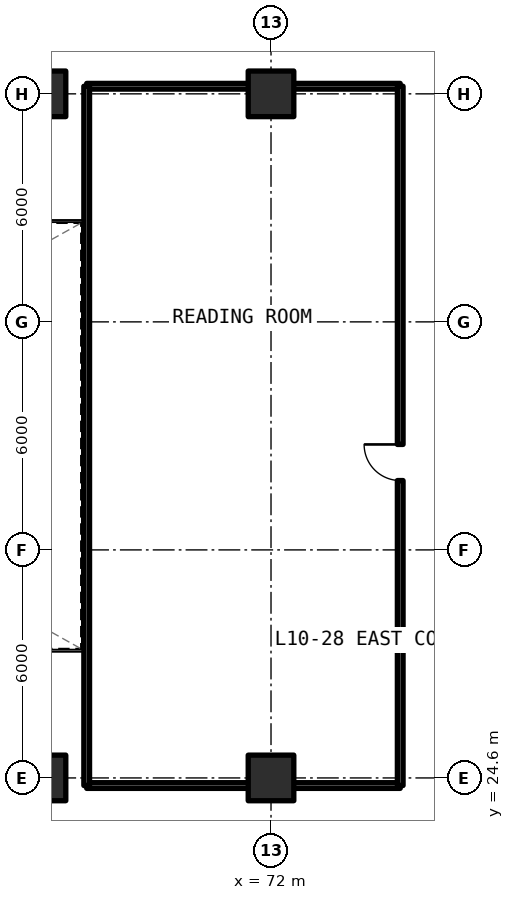
"""IFC4 building model, lengths in metres.
Left out: names, types, materials, properties, quantities, classifications, styles, units other than length and angle.
Written with IfcOpenShell. Run it as: python <this file> out.ifc"""

import sys

from ifc_helpers import new_model, si_unit, direction, frame, frame_2d, origin, origin_2d, place, context, subcontext, project, spatial, rectangle, extrude, element, fill, save


model = new_model("IFC4")
c1 = context("Model", 3, precision=1e-05, world=origin(), true_north=direction((0.0, 1.0)))
c2 = subcontext(c1, "Body", "Model", "MODEL_VIEW")
j1 = project(units=[si_unit("LENGTHUNIT", "METRE"), si_unit("PLANEANGLEUNIT", "RADIAN")], contexts=[c1])
p1 = place(None, origin())
s1 = spatial("IfcSite", under=j1, at=p1, CompositionType="ELEMENT")
p2 = place(p1, origin())
s2 = spatial("IfcBuilding", under=s1, at=p2, CompositionType="ELEMENT")
p3 = place(p2, frame((0.0, 0.0, 38.94)))
s3 = spatial("IfcBuildingStorey", under=s2, at=p3, CompositionType="ELEMENT", Elevation=38.94)
for number, where, z_axis, x_axis in (
    (1, (66.0, 24.6, 0.0), (0.0, 0.0, 1.0), (1.0, 0.0, 0.0)),
    (2, (66.0, 42.6, 0.0), (0.0, 0.0, 1.0), (1.0, 0.0, 0.0)),
    (3, (72.0, 24.6, 0.0), (0.0, 0.0, 1.0), (1.0, 0.0, 0.0)),
    (4, (72.0, 42.6, 0.0), (0.0, 0.0, 1.0), (1.0, 0.0, 0.0)),
):
    element("IfcColumn", number, at=place(p3, frame(where, z_axis=z_axis, x_axis=x_axis)), inside=s3, PredefinedType="COLUMN", context=c2, shape_type="SweptSolid", body=[
        extrude(rectangle(XDim=1.2, YDim=1.2, at=origin_2d()), origin(), (0.0, 0.0, 1.0), 3.3),
    ])
for number, where, z_axis, x_axis in (
    (5, (67.15, 24.4, 0.0), (0.0, 0.0, 1.0), (1.0, 0.0, 0.0)),
    (6, (67.15, 42.8, 0.0), (0.0, 0.0, 1.0), (1.0, 0.0, 0.0)),
):
    element("IfcWall", number, at=place(p3, frame(where, z_axis=z_axis, x_axis=x_axis)), inside=s3, PredefinedType="SOLIDWALL", context=c2, shape_type="SweptSolid", body=[
        extrude(rectangle(XDim=8.25, YDim=0.15, at=frame_2d((4.125, 0.0))), origin(), (0.0, 0.0, 1.0), 2.295),
    ])
p4 = place(p3, frame((67.15, 24.4, 0.0), z_axis=(0.0, 0.0, 1.0), x_axis=(0.0, 1.0, 0.0)))
e7 = element("IfcWall", 7, at=p4, inside=s3, PredefinedType="SOLIDWALL", context=c2, shape_type="SweptSolid", body=[
    extrude(rectangle(XDim=18.4, YDim=0.15, at=frame_2d((9.2, 0.0))), origin(), (0.0, 0.0, 1.0), 2.35),
])
p5 = place(p3, frame((75.4, 24.4, 0.0), z_axis=(0.0, 0.0, 1.0), x_axis=(0.0, 1.0, 0.0)))
e8 = element("IfcWall", 8, at=p5, inside=s3, PredefinedType="SOLIDWALL", context=c2, shape_type="SweptSolid", body=[
    extrude(rectangle(XDim=18.4, YDim=0.15, at=frame_2d((9.2, 0.0))), origin(), (0.0, 0.0, 1.0), 2.35),
])
p6 = place(p5, frame((8.025, 0.0, 0.0)))
e9 = element("IfcOpeningElement", 9, at=p6, cuts=e8, PredefinedType="OPENING", context=c2, shape_type="SweptSolid", body=[
    extrude(rectangle(XDim=0.95, YDim=2.15, at=frame_2d((0.475, 1.075))), frame((0.0, 0.085, 0.0), z_axis=(0.0, -1.0, 0.0), x_axis=(1.0, 0.0, 0.0)), (0.0, 0.0, 1.0), 0.17),
])
p7 = place(p6, origin())
e10 = element("IfcDoor", 10, at=p7, inside=s3, OperationType="SINGLE_SWING_RIGHT", PredefinedType="DOOR", context=c2, shape_type="SweptSolid", body=[
    extrude(rectangle(XDim=0.95, YDim=2.15, at=frame_2d((0.475, 1.075))), frame((0.0, 0.025, 0.0), z_axis=(0.0, -1.0, 0.0), x_axis=(1.0, 0.0, 0.0)), (0.0, 0.0, 1.0), 0.05),
])
fill(e9, e10)
save(model, sys.argv[1])
